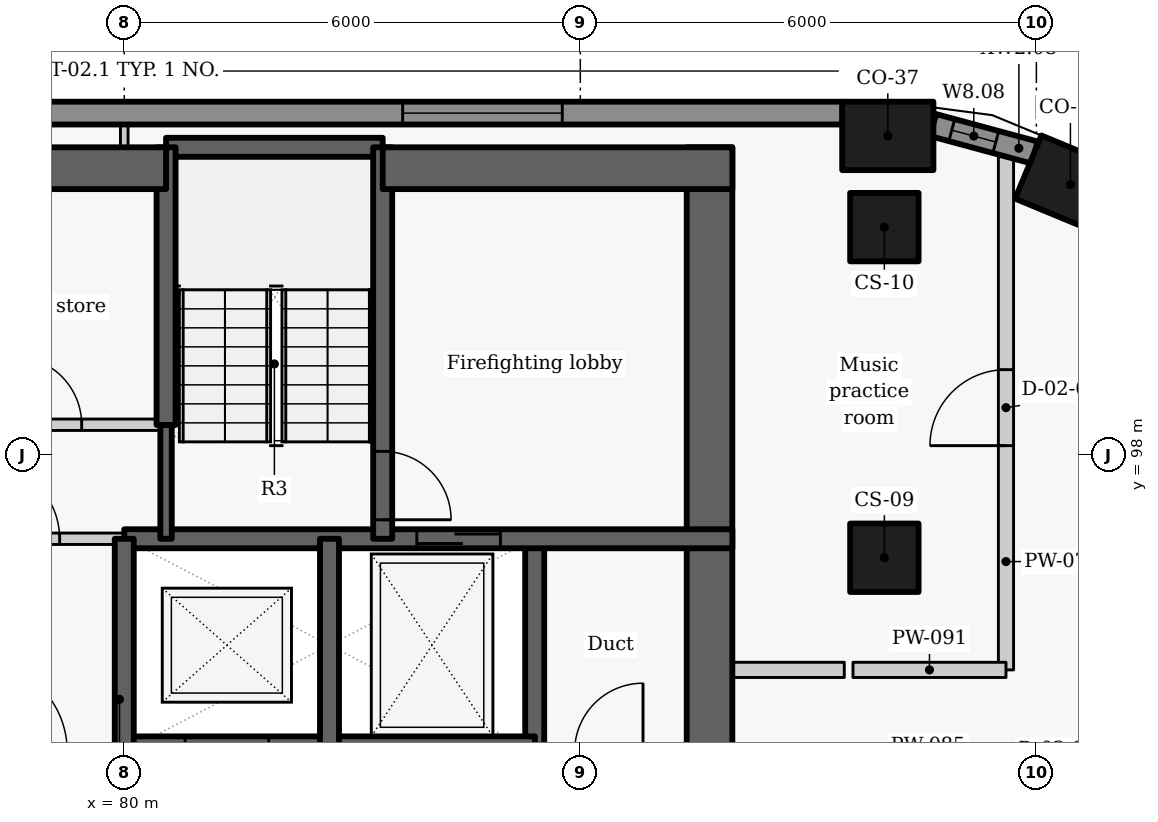
"""IFC4 building model, lengths in metres.
Left out: names, types, materials, properties, quantities, classifications, styles, units other than length and angle.
Written with IfcOpenShell. Run it as: python <this file> out.ifc"""

import sys

from ifc_helpers import new_model, si_unit, direction, frame, frame_2d, origin, origin_2d, place, context, subcontext, project, spatial, rectangle, extrude, element, fill, save


model = new_model("IFC4")
c1 = context("Model", 3, precision=1e-05, world=origin(), true_north=direction((0.0, 1.0)))
c2 = subcontext(c1, "Body", "Model", "MODEL_VIEW")
j1 = project(units=[si_unit("LENGTHUNIT", "METRE"), si_unit("PLANEANGLEUNIT", "RADIAN")], contexts=[c1])
p1 = place(None, origin())
s1 = spatial("IfcSite", under=j1, at=p1, CompositionType="ELEMENT")
p2 = place(p1, origin())
s2 = spatial("IfcBuilding", under=s1, at=p2, CompositionType="ELEMENT")
p3 = place(p2, frame((0.0, 0.0, 213.0)))
s3 = spatial("IfcBuildingStorey", under=s2, at=p3, CompositionType="ELEMENT", Elevation=213.0)
for number, where, z_axis, x_axis in (
    (1, (92.448, 101.56, 0.0), (0.0, 0.0, 1.0), (-0.924, 0.383, 0.0)),
    (2, (90.045, 102.2, 0.0), (0.0, 0.0, 1.0), (-1.0, 0.0, 0.0)),
):
    element("IfcColumn", number, at=place(p3, frame(where, z_axis=z_axis, x_axis=x_axis)), inside=s3, PredefinedType="COLUMN", context=c2, shape_type="SweptSolid", body=[
        extrude(rectangle(XDim=1.2, YDim=0.9, at=origin_2d()), origin(), (0.0, 0.0, 1.0), 3.3),
    ])
for number, where, z_axis, x_axis in (
    (3, (90.0, 96.65, 0.0), (0.0, 0.0, 1.0), (0.0, 1.0, 0.0)),
    (4, (90.0, 101.0, 0.0), (0.0, 0.0, 1.0), (0.0, 1.0, 0.0)),
):
    element("IfcColumn", number, at=place(p3, frame(where, z_axis=z_axis, x_axis=x_axis)), inside=s3, PredefinedType="COLUMN", context=c2, shape_type="SweptSolid", body=[
        extrude(rectangle(XDim=0.9, YDim=0.9, at=origin_2d()), origin(), (0.0, 0.0, 1.0), 3.3),
    ])
p4 = place(p3, frame((91.977, 101.981, 0.0), z_axis=(0.0, 0.0, 1.0), x_axis=(-0.965315341278, 0.261086751661, 0.0)))
e5 = element("IfcWall", 5, at=p4, inside=s3, PredefinedType="SOLIDWALL", context=c2, shape_type="SweptSolid", body=[
    extrude(rectangle(XDim=1.384, YDim=0.3, at=frame_2d((0.692, 0.0))), origin(), (0.0, 0.0, 1.0), 2.425),
])
p5 = place(p4, frame((0.529, 0.0, 0.9)))
e6 = element("IfcOpeningElement", 6, at=p5, cuts=e5, PredefinedType="OPENING", context=c2, shape_type="SweptSolid", body=[
    extrude(rectangle(XDim=0.6, YDim=1.1, at=frame_2d((0.3, 0.55))), frame((0.0, 0.16, 0.0), z_axis=(0.0, -1.0, 0.0), x_axis=(1.0, 0.0, 0.0)), (0.0, 0.0, 1.0), 0.32),
])
p6 = place(p3, frame((89.449, 102.5, 0.0), z_axis=(0.0, 0.0, 1.0), x_axis=(-1.0, 0.0, 0.0)))
e7 = element("IfcWall", 7, at=p6, inside=s3, PredefinedType="SOLIDWALL", context=c2, shape_type="SweptSolid", body=[
    extrude(rectangle(XDim=18.933, YDim=0.3, at=frame_2d((9.466, 0.0))), origin(), (0.0, 0.0, 1.0), 2.425),
])
p7 = place(p6, frame((3.687, 0.0, 0.9)))
e8 = element("IfcOpeningElement", 8, at=p7, cuts=e7, PredefinedType="OPENING", context=c2, shape_type="SweptSolid", body=[
    extrude(rectangle(XDim=2.1, YDim=1.1, at=frame_2d((1.05, 0.55))), frame((0.0, 0.16, 0.0), z_axis=(0.0, -1.0, 0.0), x_axis=(1.0, 0.0, 0.0)), (0.0, 0.0, 1.0), 0.32),
])
p8 = place(p6, frame((13.118, 0.0, 0.9)))
e9 = element("IfcOpeningElement", 9, at=p8, cuts=e7, PredefinedType="OPENING", context=c2, shape_type="SweptSolid", body=[
    extrude(rectangle(XDim=2.1, YDim=1.1, at=frame_2d((1.05, 0.55))), frame((0.0, 0.16, 0.0), z_axis=(0.0, -1.0, 0.0), x_axis=(1.0, 0.0, 0.0)), (0.0, 0.0, 1.0), 0.32),
])
p9 = place(p3, frame((85.4, 94.1, -0.275), z_axis=(0.0, 0.0, 1.0), x_axis=(0.0, 1.0, 0.0)))
e10 = element("IfcWall", 10, at=p9, inside=s3, PredefinedType="SHEAR", context=c2, shape_type="SweptSolid", body=[
    extrude(rectangle(XDim=2.8, YDim=0.25, at=frame_2d((1.4, 0.0))), origin(), (0.0, 0.0, 1.0), 3.3),
])
p10 = place(p3, frame((87.7, 102.05, -0.275), z_axis=(0.0, 0.0, 1.0), x_axis=(0.0, -1.0, 0.0)))
e11 = element("IfcWall", 11, at=p10, inside=s3, PredefinedType="SHEAR", context=c2, shape_type="SweptSolid", body=[
    extrude(rectangle(XDim=14.25, YDim=0.6, at=frame_2d((7.125, 0.0))), origin(), (0.0, 0.0, 1.0), 3.3),
])
p11 = place(p10, frame((8.898, 0.0, 0.275)))
e12 = element("IfcOpeningElement", 12, at=p11, cuts=e11, PredefinedType="OPENING", context=c2, shape_type="SweptSolid", body=[
    extrude(rectangle(XDim=1.5, YDim=2.1, at=frame_2d((0.75, 1.05))), frame((0.0, 0.31, 0.0), z_axis=(0.0, -1.0, 0.0), x_axis=(1.0, 0.0, 0.0)), (0.0, 0.0, 1.0), 0.62),
])
p12 = place(p3, frame((79.997, 94.1, -0.275), z_axis=(0.0, 0.0, 1.0), x_axis=(1.0, 0.0, 0.0)))
e13 = element("IfcWall", 13, at=p12, inside=s3, PredefinedType="SHEAR", context=c2, shape_type="SweptSolid", body=[
    extrude(rectangle(XDim=5.406, YDim=0.4, at=frame_2d((2.703, 0.0))), origin(), (0.0, 0.0, 1.0), 3.3),
])
p13 = place(p12, frame((0.803, 0.0, 0.275)))
e14 = element("IfcOpeningElement", 14, at=p13, cuts=e13, PredefinedType="OPENING", context=c2, shape_type="SweptSolid", body=[
    extrude(rectangle(XDim=1.1, YDim=2.1, at=frame_2d((0.55, 1.05))), frame((0.0, 0.21, 0.0), z_axis=(0.0, -1.0, 0.0), x_axis=(1.0, 0.0, 0.0)), (0.0, 0.0, 1.0), 0.42),
])
p14 = place(p3, frame((80.0, 96.9, -0.275), z_axis=(0.0, 0.0, 1.0), x_axis=(1.0, 0.0, 0.0)))
e15 = element("IfcWall", 15, at=p14, inside=s3, PredefinedType="SHEAR", context=c2, shape_type="SweptSolid", body=[
    extrude(rectangle(XDim=8.0, YDim=0.25, at=frame_2d((4.0, 0.0))), origin(), (0.0, 0.0, 1.0), 3.3),
])
p15 = place(p14, frame((3.849, 0.0, 0.275)))
e16 = element("IfcOpeningElement", 16, at=p15, cuts=e15, PredefinedType="OPENING", context=c2, shape_type="SweptSolid", body=[
    extrude(rectangle(XDim=1.1, YDim=2.1, at=frame_2d((0.55, 1.05))), frame((0.0, 0.135, 0.0), z_axis=(0.0, -1.0, 0.0), x_axis=(1.0, 0.0, 0.0)), (0.0, 0.0, 1.0), 0.27),
])
p16 = place(p3, frame((80.0, 94.1, -0.275), z_axis=(0.0, 0.0, 1.0), x_axis=(0.0, 1.0, 0.0)))
e17 = element("IfcWall", 17, at=p16, inside=s3, PredefinedType="SHEAR", context=c2, shape_type="SweptSolid", body=[
    extrude(rectangle(XDim=2.8, YDim=0.25, at=frame_2d((1.4, 0.0))), origin(), (0.0, 0.0, 1.0), 3.3),
])
p17 = place(p3, frame((77.3, 96.9, 0.0), z_axis=(0.0, 0.0, 1.0), x_axis=(1.0, 0.0, 0.0)))
e18 = element("IfcWall", 18, at=p17, inside=s3, PredefinedType="PARTITIONING", context=c2, shape_type="SweptSolid", body=[
    extrude(rectangle(XDim=2.7, YDim=0.15, at=frame_2d((1.35, 0.0))), origin(), (0.0, 0.0, 1.0), 3.025),
])
p18 = place(p17, frame((0.85, 0.0, 0.0)))
e19 = element("IfcOpeningElement", 19, at=p18, cuts=e18, PredefinedType="OPENING", context=c2, shape_type="SweptSolid", body=[
    extrude(rectangle(XDim=1.0, YDim=2.1, at=frame_2d((0.5, 1.05))), frame((0.0, 0.085, 0.0), z_axis=(0.0, -1.0, 0.0), x_axis=(1.0, 0.0, 0.0)), (0.0, 0.0, 1.0), 0.17),
])
p19 = place(p3, frame((82.7, 94.1, -0.275), z_axis=(0.0, 0.0, 1.0), x_axis=(0.0, 1.0, 0.0)))
e20 = element("IfcWall", 20, at=p19, inside=s3, PredefinedType="SHEAR", context=c2, shape_type="SweptSolid", body=[
    extrude(rectangle(XDim=2.8, YDim=0.25, at=frame_2d((1.4, 0.0))), origin(), (0.0, 0.0, 1.0), 3.3),
])
p20 = place(p3, frame((80.55, 102.05, -0.275), z_axis=(0.0, 0.0, 1.0), x_axis=(1.0, 0.0, 0.0)))
e21 = element("IfcWall", 21, at=p20, inside=s3, PredefinedType="SHEAR", context=c2, shape_type="SweptSolid", body=[
    extrude(rectangle(XDim=2.85, YDim=0.25, at=frame_2d((1.425, 0.0))), origin(), (0.0, 0.0, 1.0), 3.3),
])
p21 = place(p3, frame((83.4, 102.05, -0.275), z_axis=(0.0, 0.0, 1.0), x_axis=(0.0, -1.0, 0.0)))
e22 = element("IfcWall", 22, at=p21, inside=s3, PredefinedType="SHEAR", context=c2, shape_type="SweptSolid", body=[
    extrude(rectangle(XDim=5.15, YDim=0.25, at=frame_2d((2.575, 0.0))), origin(), (0.0, 0.0, 1.0), 3.3),
])
p22 = place(p21, frame((4.0, 0.0, 0.275)))
e23 = element("IfcOpeningElement", 23, at=p22, cuts=e22, PredefinedType="OPENING", context=c2, shape_type="SweptSolid", body=[
    extrude(rectangle(XDim=0.9, YDim=2.1, at=frame_2d((0.45, 1.05))), frame((0.0, 0.135, 0.0), z_axis=(0.0, -1.0, 0.0), x_axis=(1.0, 0.0, 0.0)), (0.0, 0.0, 1.0), 0.27),
])
p23 = place(p3, frame((80.55, 96.9, -0.275), z_axis=(0.0, 0.0, 1.0), x_axis=(0.0, 1.0, 0.0)))
e24 = element("IfcWall", 24, at=p23, inside=s3, PredefinedType="SHEAR", context=c2, shape_type="SweptSolid", body=[
    extrude(rectangle(XDim=1.503, YDim=0.15, at=frame_2d((0.751, 0.0))), origin(), (0.0, 0.0, 1.0), 3.3),
])
p24 = place(p3, frame((80.55, 98.397, -0.275), z_axis=(0.0, 0.0, 1.0), x_axis=(0.0, 1.0, 0.0)))
e25 = element("IfcWall", 25, at=p24, inside=s3, PredefinedType="SHEAR", context=c2, shape_type="SweptSolid", body=[
    extrude(rectangle(XDim=3.653, YDim=0.25, at=frame_2d((1.827, 0.0))), origin(), (0.0, 0.0, 1.0), 3.3),
])
p25 = place(p3, frame((75.35, 101.775, -0.275), z_axis=(0.0, 0.0, 1.0), x_axis=(1.0, 0.0, 0.0)))
e26 = element("IfcWall", 26, at=p25, inside=s3, PredefinedType="SHEAR", context=c2, shape_type="SweptSolid", body=[
    extrude(rectangle(XDim=5.2, YDim=0.55, at=frame_2d((2.6, 0.0))), origin(), (0.0, 0.0, 1.0), 3.3),
])
p26 = place(p3, frame((83.4, 101.775, -0.275), z_axis=(0.0, 0.0, 1.0), x_axis=(1.0, 0.0, 0.0)))
e27 = element("IfcWall", 27, at=p26, inside=s3, PredefinedType="SHEAR", context=c2, shape_type="SweptSolid", body=[
    extrude(rectangle(XDim=4.6, YDim=0.55, at=frame_2d((2.3, 0.0))), origin(), (0.0, 0.0, 1.0), 3.3),
])
p27 = place(p3, frame((75.35, 98.4, 0.0), z_axis=(0.0, 0.0, 1.0), x_axis=(1.0, 0.0, 0.0)))
e28 = element("IfcWall", 28, at=p27, inside=s3, PredefinedType="PARTITIONING", context=c2, shape_type="SweptSolid", body=[
    extrude(rectangle(XDim=5.2, YDim=0.15, at=frame_2d((2.6, 0.0))), origin(), (0.0, 0.0, 1.0), 3.025),
])
p28 = place(p27, frame((0.59, 0.0, 0.0)))
e29 = element("IfcOpeningElement", 29, at=p28, cuts=e28, PredefinedType="OPENING", context=c2, shape_type="SweptSolid", body=[
    extrude(rectangle(XDim=0.9, YDim=2.1, at=frame_2d((0.45, 1.05))), frame((0.0, 0.085, 0.0), z_axis=(0.0, -1.0, 0.0), x_axis=(1.0, 0.0, 0.0)), (0.0, 0.0, 1.0), 0.17),
])
p29 = place(p27, frame((3.19, 0.0, 0.0)))
e30 = element("IfcOpeningElement", 30, at=p29, cuts=e28, PredefinedType="OPENING", context=c2, shape_type="SweptSolid", body=[
    extrude(rectangle(XDim=0.9, YDim=2.1, at=frame_2d((0.45, 1.05))), frame((0.0, 0.085, 0.0), z_axis=(0.0, -1.0, 0.0), x_axis=(1.0, 0.0, 0.0)), (0.0, 0.0, 1.0), 0.17),
])
p30 = place(p3, frame((91.6, 95.175, 0.0), z_axis=(0.0, 0.0, 1.0), x_axis=(0.0, 1.0, 0.0)))
e31 = element("IfcWall", 31, at=p30, inside=s3, PredefinedType="PARTITIONING", context=c2, shape_type="SweptSolid", body=[
    extrude(rectangle(XDim=6.899, YDim=0.2, at=frame_2d((3.449, 0.0))), origin(), (0.0, 0.0, 1.0), 2.405),
])
p31 = place(p30, frame((2.95, 0.0, 0.0)))
e32 = element("IfcOpeningElement", 32, at=p31, cuts=e31, PredefinedType="OPENING", context=c2, shape_type="SweptSolid", body=[
    extrude(rectangle(XDim=1.0, YDim=2.1, at=frame_2d((0.5, 1.05))), frame((0.0, 0.11, 0.0), z_axis=(0.0, -1.0, 0.0), x_axis=(1.0, 0.0, 0.0)), (0.0, 0.0, 1.0), 0.22),
])
p32 = place(p3, frame((88.0, 95.175, 0.0), z_axis=(0.0, 0.0, 1.0), x_axis=(1.0, 0.0, 0.0)))
e33 = element("IfcWall", 33, at=p32, inside=s3, PredefinedType="PARTITIONING", context=c2, shape_type="SweptSolid", body=[
    extrude(rectangle(XDim=1.473, YDim=0.2, at=frame_2d((0.736, 0.0))), origin(), (0.0, 0.0, 1.0), 3.025),
])
p33 = place(p3, frame((89.587, 95.175, 0.0), z_axis=(0.0, 0.0, 1.0), x_axis=(1.0, 0.0, 0.0)))
e34 = element("IfcWall", 34, at=p33, inside=s3, PredefinedType="PARTITIONING", context=c2, shape_type="SweptSolid", body=[
    extrude(rectangle(XDim=2.013, YDim=0.2, at=frame_2d((1.006, 0.0))), origin(), (0.0, 0.0, 1.0), 2.505),
])
p34 = place(p3, frame((80.0, 102.05, 0.0), z_axis=(0.0, 0.0, 1.0), x_axis=(0.0, 1.0, 0.0)))
e35 = element("IfcWall", 35, at=p34, inside=s3, PredefinedType="PARTITIONING", context=c2, shape_type="SweptSolid", body=[
    extrude(rectangle(XDim=0.3, YDim=0.1, at=frame_2d((0.15, 0.0))), origin(), (0.0, 0.0, 1.0), 3.025),
])
p35 = place(p5, origin())
e36 = element("IfcWindow", 36, at=p35, inside=s3, PartitioningType="SINGLE_PANEL", PredefinedType="WINDOW", context=c2, shape_type="SweptSolid", body=[
    extrude(rectangle(XDim=0.6, YDim=1.1, at=frame_2d((0.3, 0.55))), frame((0.0, 0.03, 0.0), z_axis=(0.0, -1.0, 0.0), x_axis=(1.0, 0.0, 0.0)), (0.0, 0.0, 1.0), 0.06),
])
fill(e6, e36)
p36 = place(p7, origin())
e37 = element("IfcWindow", 37, at=p36, inside=s3, PartitioningType="SINGLE_PANEL", PredefinedType="WINDOW", context=c2, shape_type="SweptSolid", body=[
    extrude(rectangle(XDim=2.1, YDim=1.1, at=frame_2d((1.05, 0.55))), frame((0.0, 0.03, 0.0), z_axis=(0.0, -1.0, 0.0), x_axis=(1.0, 0.0, 0.0)), (0.0, 0.0, 1.0), 0.06),
])
fill(e8, e37)
p37 = place(p15, origin())
e38 = element("IfcDoor", 38, at=p37, inside=s3, OperationType="SLIDING_TO_LEFT", PredefinedType="DOOR", context=c2, shape_type="SweptSolid", body=[
    extrude(rectangle(XDim=1.1, YDim=2.1, at=frame_2d((0.55, 1.05))), frame((0.0, 0.025, 0.0), z_axis=(0.0, -1.0, 0.0), x_axis=(1.0, 0.0, 0.0)), (0.0, 0.0, 1.0), 0.05),
])
fill(e16, e38)
p38 = place(p18, origin())
e39 = element("IfcDoor", 39, at=p38, inside=s3, OperationType="SINGLE_SWING_LEFT", PredefinedType="DOOR", context=c2, shape_type="SweptSolid", body=[
    extrude(rectangle(XDim=1.0, YDim=2.1, at=frame_2d((0.5, 1.05))), frame((0.0, 0.025, 0.0), z_axis=(0.0, -1.0, 0.0), x_axis=(1.0, 0.0, 0.0)), (0.0, 0.0, 1.0), 0.05),
])
fill(e19, e39)
p39 = place(p29, origin())
e40 = element("IfcDoor", 40, at=p39, inside=s3, OperationType="SINGLE_SWING_LEFT", PredefinedType="DOOR", context=c2, shape_type="SweptSolid", body=[
    extrude(rectangle(XDim=0.9, YDim=2.1, at=frame_2d((0.45, 1.05))), frame((0.0, 0.025, 0.0), z_axis=(0.0, -1.0, 0.0), x_axis=(1.0, 0.0, 0.0)), (0.0, 0.0, 1.0), 0.05),
])
fill(e30, e40)
p40 = place(p22, origin())
e41 = element("IfcDoor", 41, at=p40, inside=s3, OperationType="SINGLE_SWING_RIGHT", PredefinedType="DOOR", context=c2, shape_type="SweptSolid", body=[
    extrude(rectangle(XDim=0.9, YDim=2.1, at=frame_2d((0.45, 1.05))), frame((0.0, 0.025, 0.0), z_axis=(0.0, -1.0, 0.0), x_axis=(1.0, 0.0, 0.0)), (0.0, 0.0, 1.0), 0.05),
])
fill(e23, e41)
p41 = place(p31, origin())
e42 = element("IfcDoor", 42, at=p41, inside=s3, OperationType="SINGLE_SWING_LEFT", PredefinedType="DOOR", context=c2, shape_type="SweptSolid", body=[
    extrude(rectangle(XDim=1.0, YDim=2.1, at=frame_2d((0.5, 1.05))), frame((0.0, 0.025, 0.0), z_axis=(0.0, -1.0, 0.0), x_axis=(1.0, 0.0, 0.0)), (0.0, 0.0, 1.0), 0.05),
])
fill(e32, e42)
save(model, sys.argv[1])
